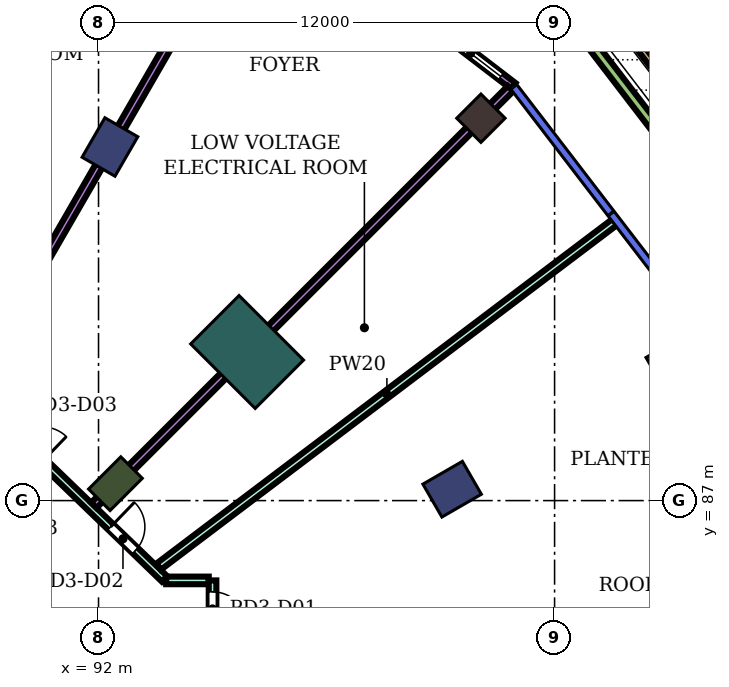
"""IFC4 building model, lengths in metres.
Left out: names, types, materials, properties, quantities, classifications, styles, units other than length and angle.
Written with IfcOpenShell. Run it as: python <this file> out.ifc"""

import sys

from ifc_helpers import new_model, si_unit, direction, frame, frame_2d, origin, origin_2d, place, context, subcontext, project, spatial, rectangle, extrude, element, fill, save


model = new_model("IFC4")
c1 = context("Model", 3, precision=1e-05, world=origin(), true_north=direction((0.0, 1.0)))
c2 = subcontext(c1, "Body", "Model", "MODEL_VIEW")
j1 = project(units=[si_unit("LENGTHUNIT", "METRE"), si_unit("PLANEANGLEUNIT", "RADIAN")], contexts=[c1])
p1 = place(None, origin())
s1 = spatial("IfcSite", under=j1, at=p1, CompositionType="ELEMENT")
p2 = place(p1, origin())
s2 = spatial("IfcBuilding", under=s1, at=p2, CompositionType="ELEMENT")
p3 = place(p2, frame((0.0, 0.0, 17.8)))
s3 = spatial("IfcBuildingStorey", under=s2, at=p3, CompositionType="ELEMENT", Elevation=17.8)
for number, where, z_axis, x_axis in (
    (1, (107.02, 90.6, 0.0), (0.0, 0.0, 1.0), (0.866, 0.5, 0.0)),
    (2, (102.062, 97.062, 0.0), (0.0, 0.0, 1.0), (0.707, 0.707, 0.0)),
):
    element("IfcColumn", number, at=place(p3, frame(where, z_axis=z_axis, x_axis=x_axis)), inside=s3, PredefinedType="COLUMN", context=c2, shape_type="SweptSolid", body=[
        extrude(rectangle(XDim=0.9, YDim=0.9, at=origin_2d()), origin(), (0.0, 0.0, 1.0), 6.0),
    ])
for number, where, z_axis, x_axis in (
    (3, (101.304, 87.3, 0.0), (0.0, 0.0, 1.0), (0.866, 0.5, 0.0)),
    (4, (92.3, 96.304, 0.0), (0.0, 0.0, 1.0), (0.5, 0.866, 0.0)),
):
    element("IfcColumn", number, at=place(p3, frame(where, z_axis=z_axis, x_axis=x_axis)), inside=s3, PredefinedType="COLUMN", context=c2, shape_type="SweptSolid", body=[
        extrude(rectangle(XDim=1.2, YDim=1.0, at=origin_2d()), origin(), (0.0, 0.0, 1.0), 6.0),
    ])
p4 = place(p3, frame((92.445, 87.445, 0.0), z_axis=(0.0, 0.0, 1.0), x_axis=(0.707106781187, 0.707106781187, 0.0)))
e5 = element("IfcColumn", 5, at=p4, inside=s3, PredefinedType="COLUMN", context=c2, shape_type="SweptSolid", body=[
    extrude(rectangle(XDim=1.2, YDim=0.8, at=origin_2d()), origin(), (0.0, 0.0, 1.0), 6.0),
])
p5 = place(p3, frame((95.91, 90.91, 0.0), z_axis=(0.0, 0.0, 1.0), x_axis=(0.707106781187, 0.707106781187, 0.0)))
e6 = element("IfcColumn", 6, at=p5, inside=s3, PredefinedType="COLUMN", context=c2, shape_type="SweptSolid", body=[
    extrude(rectangle(XDim=1.8, YDim=2.4, at=origin_2d()), origin(), (0.0, 0.0, 1.0), 6.0),
])
p6 = place(p3, frame((102.91, 97.91, 0.0), z_axis=(0.0, 0.0, 1.0), x_axis=(-0.793353093047, 0.608761751223, 0.0)))
e7 = element("IfcWall", 7, at=p6, inside=s3, PredefinedType="NOTDEFINED", context=c2, shape_type="SweptSolid", body=[
    extrude(rectangle(XDim=8.458, YDim=0.2, at=frame_2d((4.229, 0.0))), origin(), (0.0, 0.0, 1.0), 6.0),
])
p7 = place(p6, frame((0.41, 0.0, 0.9)))
e8 = element("IfcOpeningElement", 8, at=p7, cuts=e7, PredefinedType="OPENING", context=c2, shape_type="SweptSolid", body=[
    extrude(rectangle(XDim=2.0, YDim=3.0, at=frame_2d((1.0, 1.5))), frame((0.0, 0.11, 0.0), z_axis=(0.0, -1.0, 0.0), x_axis=(1.0, 0.0, 0.0)), (0.0, 0.0, 1.0), 0.22),
])
p8 = place(p6, frame((3.329, 0.0, 0.0)))
e9 = element("IfcOpeningElement", 9, at=p8, cuts=e7, PredefinedType="OPENING", context=c2, shape_type="SweptSolid", body=[
    extrude(rectangle(XDim=1.8, YDim=2.4, at=frame_2d((0.9, 1.2))), frame((0.0, 0.11, 0.0), z_axis=(0.0, -1.0, 0.0), x_axis=(1.0, 0.0, 0.0)), (0.0, 0.0, 1.0), 0.22),
])
p9 = place(p6, frame((6.048, 0.0, 0.9)))
e10 = element("IfcOpeningElement", 10, at=p9, cuts=e7, PredefinedType="OPENING", context=c2, shape_type="SweptSolid", body=[
    extrude(rectangle(XDim=2.0, YDim=3.0, at=frame_2d((1.0, 1.5))), frame((0.0, 0.11, 0.0), z_axis=(0.0, -1.0, 0.0), x_axis=(1.0, 0.0, 0.0)), (0.0, 0.0, 1.0), 0.22),
])
p10 = place(p3, frame((105.25, 100.231, 0.0), z_axis=(0.0, 0.0, 1.0), x_axis=(0.608745337968, -0.793365687122, 0.0)))
e11 = element("IfcWall", 11, at=p10, inside=s3, PredefinedType="PARAPET", context=c2, shape_type="SweptSolid", body=[
    extrude(rectangle(XDim=9.292, YDim=0.2, at=frame_2d((4.646, 0.0))), origin(), (0.0, 0.0, 1.0), 1.1),
])
p11 = place(p3, frame((104.55, 99.55, 0.0), z_axis=(0.0, 0.0, 1.0), x_axis=(0.608756077719, -0.793357446452, 0.0)))
e12 = element("IfcWall", 12, at=p11, inside=s3, PredefinedType="USERDEFINED", context=c2, shape_type="SweptSolid", body=[
    extrude(rectangle(XDim=3.932, YDim=0.25, at=frame_2d((1.966, 0.0))), origin(), (0.0, 0.0, 1.0), 0.6),
])
p12 = place(p3, frame((88.669, 89.833, 0.0), z_axis=(0.0, 0.0, 1.0), x_axis=(0.719424754683, -0.694570386893, 0.0)))
e13 = element("IfcWall", 13, at=p12, inside=s3, PredefinedType="PARTITIONING", context=c2, shape_type="SweptSolid", body=[
    extrude(rectangle(XDim=7.043, YDim=0.2, at=frame_2d((3.521, 0.0))), origin(), (0.0, 0.0, 1.0), 5.55),
])
p13 = place(p12, frame((5.074, 0.0, 0.0)))
e14 = element("IfcOpeningElement", 14, at=p13, cuts=e13, PredefinedType="OPENING", context=c2, shape_type="SweptSolid", body=[
    extrude(rectangle(XDim=0.9, YDim=2.1, at=frame_2d((0.45, 1.05))), frame((0.0, 0.11, 0.0), z_axis=(0.0, -1.0, 0.0), x_axis=(1.0, 0.0, 0.0)), (0.0, 0.0, 1.0), 0.22),
])
p14 = place(p12, frame((1.684, 0.0, 0.0)))
e15 = element("IfcOpeningElement", 15, at=p14, cuts=e13, PredefinedType="OPENING", context=c2, shape_type="SweptSolid", body=[
    extrude(rectangle(XDim=0.9, YDim=2.1, at=frame_2d((0.45, 1.05))), frame((0.0, 0.11, 0.0), z_axis=(0.0, -1.0, 0.0), x_axis=(1.0, 0.0, 0.0)), (0.0, 0.0, 1.0), 0.22),
])
p15 = place(p3, frame((88.601, 89.897, 0.0), z_axis=(0.0, 0.0, 1.0), x_axis=(0.500043970552, 0.866000015886, 0.0)))
e16 = element("IfcWall", 16, at=p15, inside=s3, PredefinedType="PARTITIONING", context=c2, shape_type="SweptSolid", body=[
    extrude(rectangle(XDim=15.096, YDim=0.2, at=frame_2d((7.548, 0.0))), origin(), (0.0, 0.0, 1.0), 4.55),
])
p16 = place(p3, frame((91.876, 86.876, 0.0), z_axis=(0.0, 0.0, 1.0), x_axis=(0.707106781187, 0.707106781187, 0.0)))
e17 = element("IfcWall", 17, at=p16, inside=s3, PredefinedType="PARTITIONING", context=c2, shape_type="SweptSolid", body=[
    extrude(rectangle(XDim=15.503, YDim=0.2, at=frame_2d((7.752, 0.0))), origin(), (0.0, 0.0, 1.0), 4.55),
])
p17 = place(p3, frame((93.578, 85.259, 0.0), z_axis=(0.0, 0.0, 1.0), x_axis=(0.797859702554, 0.602843176159, 0.0)))
e18 = element("IfcWall", 18, at=p17, inside=s3, PredefinedType="PARTITIONING", context=c2, shape_type="SweptSolid", body=[
    extrude(rectangle(XDim=15.065, YDim=0.2, at=frame_2d((7.533, 0.0))), origin(), (0.0, 0.0, 1.0), 5.55),
])
p18 = place(p3, frame((93.78, 84.9, 0.0), z_axis=(0.0, 0.0, 1.0), x_axis=(1.0, 0.0, 0.0)))
e19 = element("IfcWall", 19, at=p18, inside=s3, PredefinedType="PARTITIONING", context=c2, shape_type="SweptSolid", body=[
    extrude(rectangle(XDim=1.12, YDim=0.2, at=frame_2d((0.56, 0.0))), origin(), (0.0, 0.0, 1.0), 5.55),
])
p19 = place(p3, frame((95.0, 83.401, 0.0), z_axis=(0.0, 0.0, 1.0), x_axis=(0.0, 1.0, 0.0)))
e20 = element("IfcWall", 20, at=p19, inside=s3, PredefinedType="PARTITIONING", context=c2, shape_type="SweptSolid", body=[
    extrude(rectangle(XDim=1.499, YDim=0.2, at=frame_2d((0.75, 0.0))), origin(), (0.0, 0.0, 1.0), 5.55),
])
p20 = place(p19, frame((0.299, 0.0, 0.0)))
e21 = element("IfcOpeningElement", 21, at=p20, cuts=e20, PredefinedType="OPENING", context=c2, shape_type="SweptSolid", body=[
    extrude(rectangle(XDim=0.9, YDim=2.1, at=frame_2d((0.45, 1.05))), frame((0.0, 0.11, 0.0), z_axis=(0.0, -1.0, 0.0), x_axis=(1.0, 0.0, 0.0)), (0.0, 0.0, 1.0), 0.22),
])
p21 = place(p7, origin())
e22 = element("IfcWindow", 22, at=p21, inside=s3, PartitioningType="SINGLE_PANEL", PredefinedType="WINDOW", context=c2, shape_type="SweptSolid", body=[
    extrude(rectangle(XDim=2.0, YDim=3.0, at=frame_2d((1.0, 1.5))), frame((0.0, 0.03, 0.0), z_axis=(0.0, -1.0, 0.0), x_axis=(1.0, 0.0, 0.0)), (0.0, 0.0, 1.0), 0.06),
])
fill(e8, e22)
p22 = place(p20, frame((0.9, 0.0, 0.0), z_axis=(0.0, 0.0, 1.0), x_axis=(-1.0, 0.0, 0.0)))
e23 = element("IfcDoor", 23, at=p22, inside=s3, OperationType="SINGLE_SWING_RIGHT", PredefinedType="DOOR", context=c2, shape_type="SweptSolid", body=[
    extrude(rectangle(XDim=0.9, YDim=2.1, at=frame_2d((0.45, 1.05))), frame((0.0, 0.025, 0.0), z_axis=(0.0, -1.0, 0.0), x_axis=(1.0, 0.0, 0.0)), (0.0, 0.0, 1.0), 0.05),
])
fill(e21, e23)
p23 = place(p13, origin())
e24 = element("IfcDoor", 24, at=p23, inside=s3, OperationType="SINGLE_SWING_LEFT", PredefinedType="DOOR", context=c2, shape_type="SweptSolid", body=[
    extrude(rectangle(XDim=0.9, YDim=2.1, at=frame_2d((0.45, 1.05))), frame((0.0, 0.025, 0.0), z_axis=(0.0, -1.0, 0.0), x_axis=(1.0, 0.0, 0.0)), (0.0, 0.0, 1.0), 0.05),
])
fill(e14, e24)
save(model, sys.argv[1])
